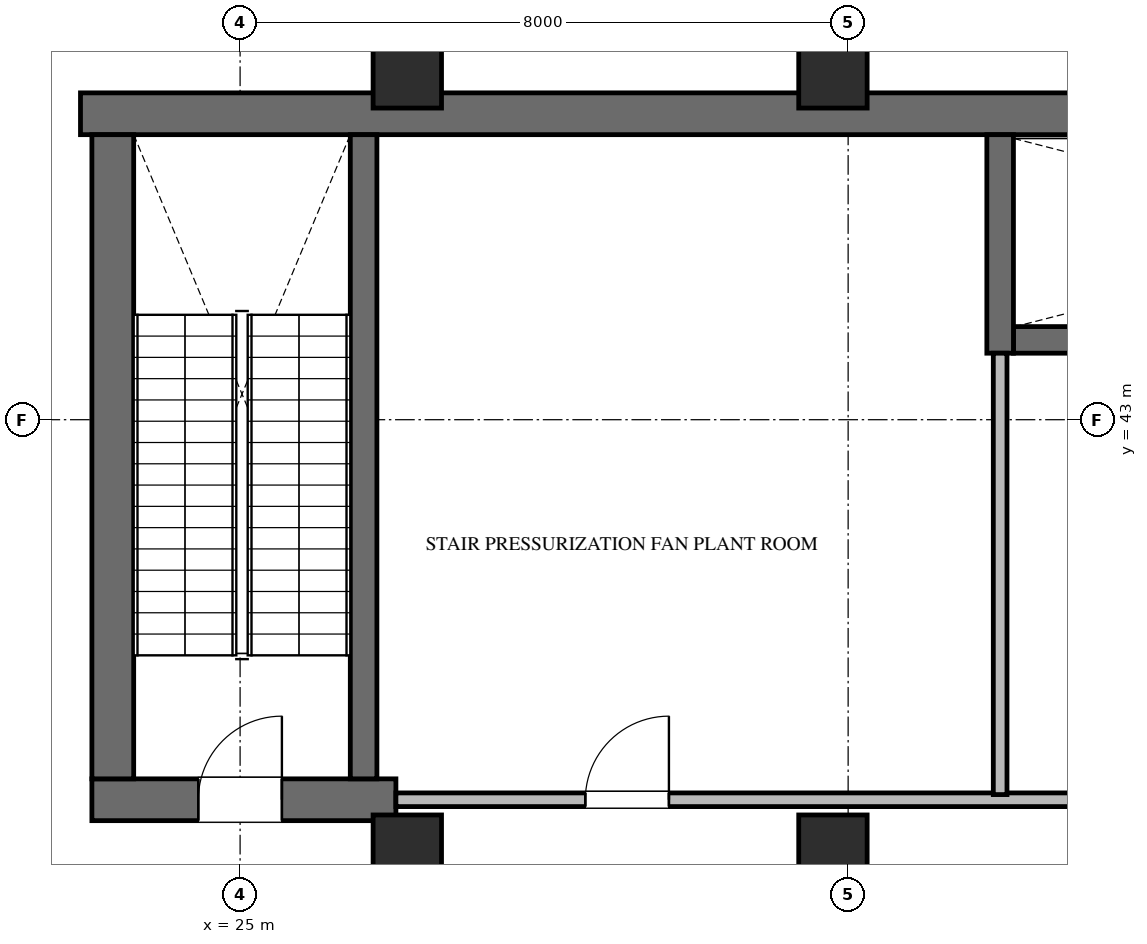
"""IFC4 building model, lengths in metres.
Left out: names, types, materials, properties, quantities, classifications, styles, units other than length and angle.
Written with IfcOpenShell. Run it as: python <this file> out.ifc"""

import sys

from ifc_helpers import new_model, si_unit, direction, frame, frame_2d, origin, origin_2d, place, context, subcontext, project, spatial, rectangle, extrude, element, fill, save


model = new_model("IFC4")
c1 = context("Model", 3, precision=1e-05, world=origin(), true_north=direction((0.0, 1.0)))
c2 = subcontext(c1, "Body", "Model", "MODEL_VIEW")
j1 = project(units=[si_unit("LENGTHUNIT", "METRE"), si_unit("PLANEANGLEUNIT", "RADIAN")], contexts=[c1])
p1 = place(None, origin())
s1 = spatial("IfcSite", under=j1, at=p1, CompositionType="ELEMENT")
p2 = place(p1, origin())
s2 = spatial("IfcBuilding", under=s1, at=p2, CompositionType="ELEMENT")
p3 = place(p2, frame((0.0, 0.0, 225.0)))
s3 = spatial("IfcBuildingStorey", under=s2, at=p3, CompositionType="ELEMENT", Elevation=225.0)
p4 = place(p3, frame((22.9, 47.025, 0.0), z_axis=(0.0, 0.0, 1.0), x_axis=(1.0, 0.0, 0.0)))
e1 = element("IfcWall", 1, at=p4, inside=s3, PredefinedType="SHEAR", context=c2, shape_type="SweptSolid", body=[
    extrude(rectangle(XDim=43.5, YDim=0.55, at=frame_2d((21.75, 0.0))), origin(), (0.0, 0.0, 1.0), 6.0),
])
p5 = place(p3, frame((35.175, 44.05, 0.0), z_axis=(0.0, 0.0, 1.0), x_axis=(1.0, 0.0, 0.0)))
e2 = element("IfcWall", 2, at=p5, inside=s3, PredefinedType="SHEAR", context=c2, shape_type="SweptSolid", body=[
    extrude(rectangle(XDim=9.7, YDim=0.35, at=frame_2d((4.85, 0.0))), origin(), (0.0, 0.0, 1.0), 6.0),
])
p6 = place(p3, frame((35.0, 43.875, 0.0), z_axis=(0.0, 0.0, 1.0), x_axis=(0.0, 1.0, 0.0)))
e3 = element("IfcWall", 3, at=p6, inside=s3, PredefinedType="SHEAR", context=c2, shape_type="SweptSolid", body=[
    extrude(rectangle(XDim=2.875, YDim=0.35, at=frame_2d((1.438, 0.0))), origin(), (0.0, 0.0, 1.0), 6.0),
])
p7 = place(p3, frame((23.05, 38.0, 0.0), z_axis=(0.0, 0.0, 1.0), x_axis=(1.0, 0.0, 0.0)))
e4 = element("IfcWall", 4, at=p7, inside=s3, PredefinedType="SHEAR", context=c2, shape_type="SweptSolid", body=[
    extrude(rectangle(XDim=4.0, YDim=0.55, at=frame_2d((2.0, 0.0))), origin(), (0.0, 0.0, 1.0), 6.0),
])
p8 = place(p7, frame((1.4, 0.0, 0.0)))
e5 = element("IfcOpeningElement", 5, at=p8, cuts=e4, PredefinedType="OPENING", context=c2, shape_type="SweptSolid", body=[
    extrude(rectangle(XDim=1.1, YDim=2.2, at=frame_2d((0.55, 1.1))), frame((0.0, 0.285, 0.0), z_axis=(0.0, -1.0, 0.0), x_axis=(1.0, 0.0, 0.0)), (0.0, 0.0, 1.0), 0.57),
])
p9 = place(p3, frame((23.325, 38.275, 0.0), z_axis=(0.0, 0.0, 1.0), x_axis=(0.0, 1.0, 0.0)))
e6 = element("IfcWall", 6, at=p9, inside=s3, PredefinedType="SHEAR", context=c2, shape_type="SweptSolid", body=[
    extrude(rectangle(XDim=8.475, YDim=0.55, at=frame_2d((4.238, 0.0))), origin(), (0.0, 0.0, 1.0), 6.0),
])
p10 = place(p3, frame((26.625, 38.275, 0.0), z_axis=(0.0, 0.0, 1.0), x_axis=(0.0, 1.0, 0.0)))
e7 = element("IfcWall", 7, at=p10, inside=s3, PredefinedType="SHEAR", context=c2, shape_type="SweptSolid", body=[
    extrude(rectangle(XDim=8.475, YDim=0.35, at=frame_2d((4.238, 0.0))), origin(), (0.0, 0.0, 1.0), 6.0),
])
for number, where, z_axis, x_axis in (
    (8, (32.8, 37.35, 0.0), (0.0, 0.0, 1.0), (1.0, 0.0, 0.0)),
    (9, (32.8, 47.55, 0.0), (0.0, 0.0, 1.0), (1.0, 0.0, 0.0)),
    (10, (27.2, 37.35, 0.0), (0.0, 0.0, 1.0), (1.0, 0.0, 0.0)),
    (11, (27.2, 47.55, 0.0), (0.0, 0.0, 1.0), (1.0, 0.0, 0.0)),
):
    element("IfcColumn", number, at=place(p3, frame(where, z_axis=z_axis, x_axis=x_axis)), inside=s3, PredefinedType="COLUMN", context=c2, shape_type="SweptSolid", body=[
        extrude(rectangle(XDim=0.9, YDim=0.9, at=origin_2d()), origin(), (0.0, 0.0, 1.0), 6.0),
    ])
p11 = place(p3, frame((27.05, 38.0, 0.0), z_axis=(0.0, 0.0, 1.0), x_axis=(1.0, 0.0, 0.0)))
e12 = element("IfcWall", 12, at=p11, inside=s3, PredefinedType="STANDARD", context=c2, shape_type="SweptSolid", body=[
    extrude(rectangle(XDim=18.0, YDim=0.18, at=frame_2d((9.0, 0.0))), origin(), (0.0, 0.0, 1.0), 4.977),
])
p12 = place(p11, frame((2.492, 0.0, 0.0)))
e13 = element("IfcOpeningElement", 13, at=p12, cuts=e12, PredefinedType="OPENING", context=c2, shape_type="SweptSolid", body=[
    extrude(rectangle(XDim=1.1, YDim=2.2, at=frame_2d((0.55, 1.1))), frame((0.0, 0.1, 0.0), z_axis=(0.0, -1.0, 0.0), x_axis=(1.0, 0.0, 0.0)), (0.0, 0.0, 1.0), 0.2),
])
p13 = place(p11, frame((14.109, 0.0, 0.0)))
e14 = element("IfcOpeningElement", 14, at=p13, cuts=e12, PredefinedType="OPENING", context=c2, shape_type="SweptSolid", body=[
    extrude(rectangle(XDim=1.1, YDim=2.2, at=frame_2d((0.55, 1.1))), frame((0.0, 0.1, 0.0), z_axis=(0.0, -1.0, 0.0), x_axis=(1.0, 0.0, 0.0)), (0.0, 0.0, 1.0), 0.2),
])
p14 = place(p3, frame((35.0, 38.068, 0.0), z_axis=(0.0, 0.0, 1.0), x_axis=(0.0, 1.0, 0.0)))
e15 = element("IfcWall", 15, at=p14, inside=s3, PredefinedType="STANDARD", context=c2, shape_type="SweptSolid", body=[
    extrude(rectangle(XDim=5.807, YDim=0.18, at=frame_2d((2.903, 0.0))), origin(), (0.0, 0.0, 1.0), 5.75),
])
p15 = place(p8, origin())
e16 = element("IfcDoor", 16, at=p15, inside=s3, OperationType="SINGLE_SWING_RIGHT", PredefinedType="DOOR", context=c2, shape_type="SweptSolid", body=[
    extrude(rectangle(XDim=1.1, YDim=2.2, at=frame_2d((0.55, 1.1))), frame((0.0, 0.025, 0.0), z_axis=(0.0, -1.0, 0.0), x_axis=(1.0, 0.0, 0.0)), (0.0, 0.0, 1.0), 0.05),
])
fill(e5, e16)
p16 = place(p12, origin())
e17 = element("IfcDoor", 17, at=p16, inside=s3, OperationType="SINGLE_SWING_RIGHT", PredefinedType="DOOR", context=c2, shape_type="SweptSolid", body=[
    extrude(rectangle(XDim=1.1, YDim=2.2, at=frame_2d((0.55, 1.1))), frame((0.0, 0.025, 0.0), z_axis=(0.0, -1.0, 0.0), x_axis=(1.0, 0.0, 0.0)), (0.0, 0.0, 1.0), 0.05),
])
fill(e13, e17)
save(model, sys.argv[1])
